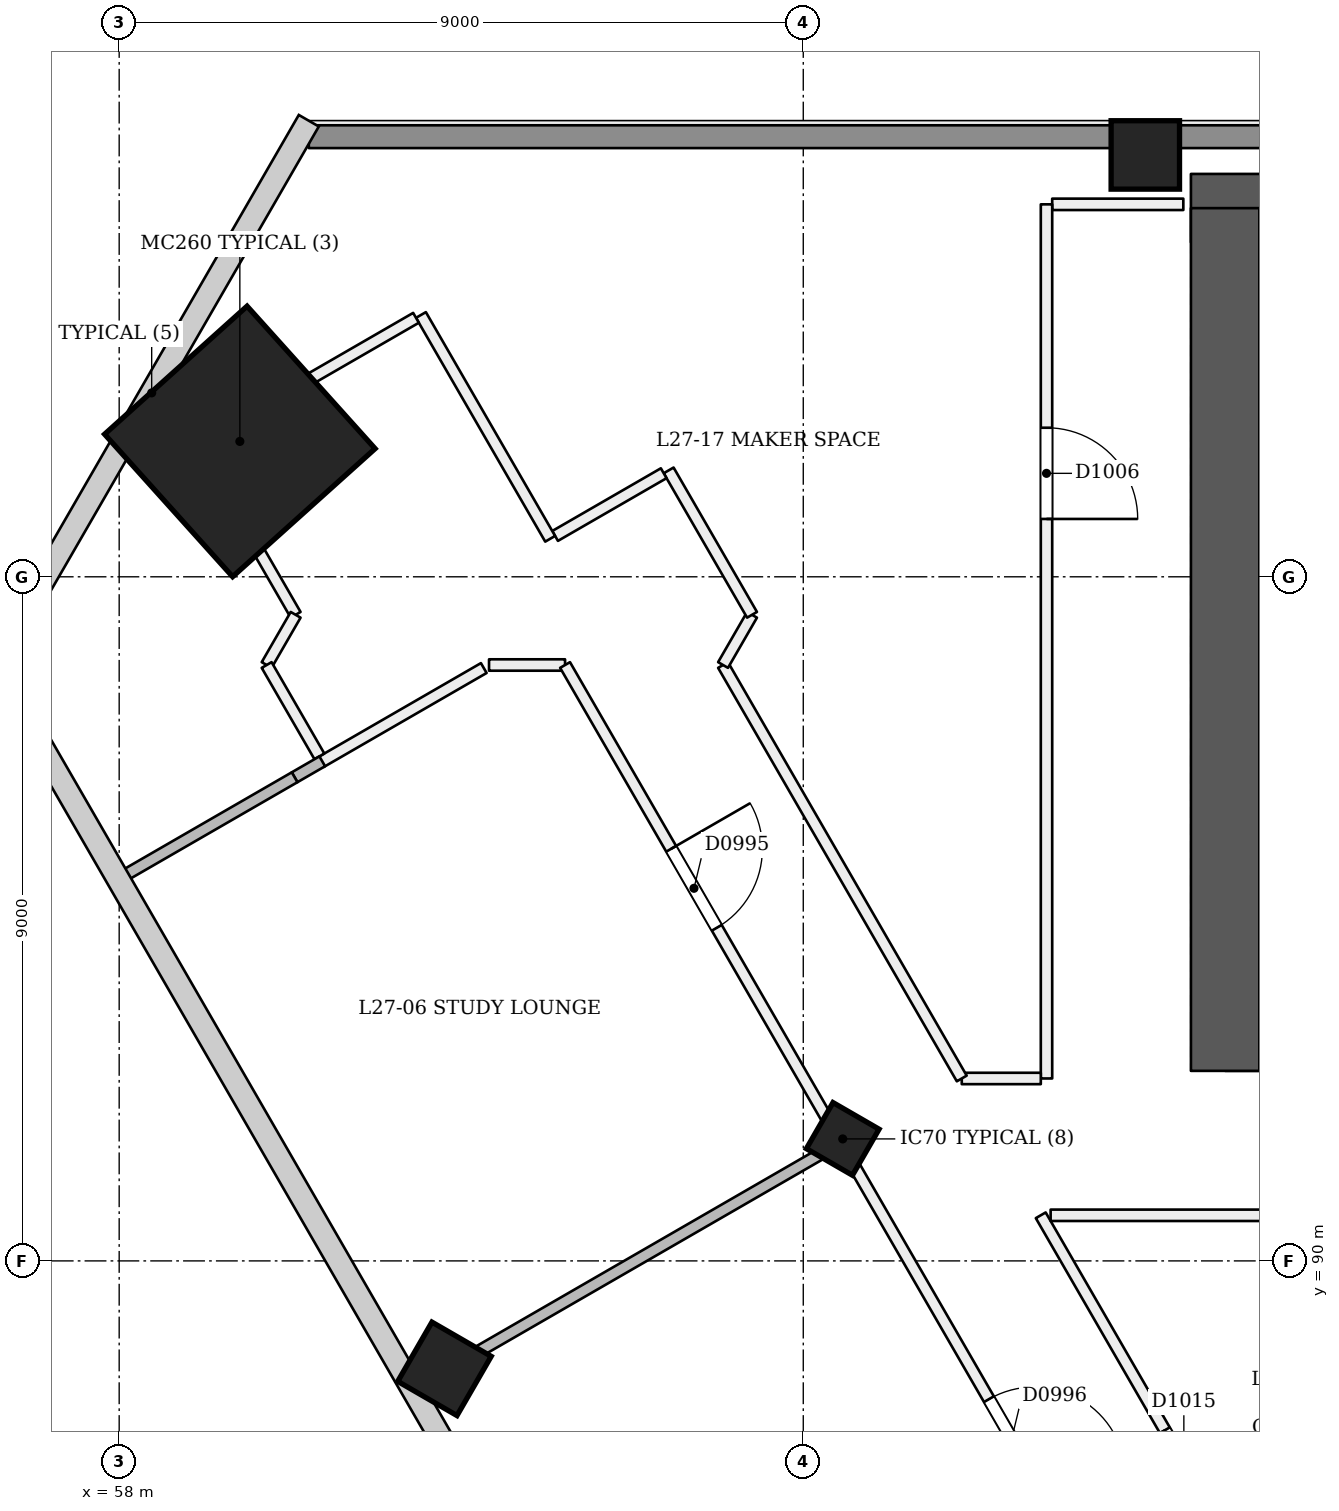
"""IFC4 building model, lengths in metres.
Left out: names, types, materials, properties, quantities, classifications, styles, units other than length and angle.
Written with IfcOpenShell. Run it as: python <this file> out.ifc"""

import sys

from ifc_helpers import new_model, si_unit, direction, frame, frame_2d, origin, origin_2d, place, context, subcontext, project, spatial, rectangle, extrude, element, fill, save


model = new_model("IFC4")
c1 = context("Model", 3, precision=1e-05, world=origin(), true_north=direction((0.0, 1.0)))
c2 = subcontext(c1, "Body", "Model", "MODEL_VIEW")
j1 = project(units=[si_unit("LENGTHUNIT", "METRE"), si_unit("PLANEANGLEUNIT", "RADIAN")], contexts=[c1])
p1 = place(None, origin())
s1 = spatial("IfcSite", under=j1, at=p1, CompositionType="ELEMENT")
p2 = place(p1, origin())
s2 = spatial("IfcBuilding", under=s1, at=p2, CompositionType="ELEMENT")
p3 = place(p2, frame((0.0, 0.0, 108.0)))
s3 = spatial("IfcBuildingStorey", under=s2, at=p3, CompositionType="ELEMENT", Elevation=108.0)
p4 = place(p3, frame((72.55, 92.95, 0.0), z_axis=(0.0, 0.0, 1.0), x_axis=(1.0, 0.0, 0.0)))
e1 = element("IfcWall", 1, at=p4, inside=s3, PredefinedType="SHEAR", context=c2, shape_type="SweptSolid", body=[
    extrude(rectangle(XDim=25.35, YDim=0.9, at=frame_2d((12.675, 0.0))), origin(), (0.0, 0.0, 1.0), 3.6),
])
p5 = place(p4, frame((1.25, 0.0, 0.0)))
e2 = element("IfcOpeningElement", 2, at=p5, cuts=e1, PredefinedType="OPENING", context=c2, shape_type="SweptSolid", body=[
    extrude(rectangle(XDim=1.2, YDim=2.1, at=frame_2d((0.6, 1.05))), frame((0.0, 0.46, 0.0), z_axis=(0.0, -1.0, 0.0), x_axis=(1.0, 0.0, 0.0)), (0.0, 0.0, 1.0), 0.921),
])
p6 = place(p4, frame((3.45, 0.0, 0.0)))
e3 = element("IfcOpeningElement", 3, at=p6, cuts=e1, PredefinedType="OPENING", context=c2, shape_type="SweptSolid", body=[
    extrude(rectangle(XDim=1.2, YDim=2.1, at=frame_2d((0.6, 1.05))), frame((0.0, 0.46, 0.0), z_axis=(0.0, -1.0, 0.0), x_axis=(1.0, 0.0, 0.0)), (0.0, 0.0, 1.0), 0.921),
])
p7 = place(p4, frame((13.45, 0.0, 0.0)))
e4 = element("IfcOpeningElement", 4, at=p7, cuts=e1, PredefinedType="OPENING", context=c2, shape_type="SweptSolid", body=[
    extrude(rectangle(XDim=1.2, YDim=2.1, at=frame_2d((0.6, 1.05))), frame((0.0, 0.46, 0.0), z_axis=(0.0, -1.0, 0.0), x_axis=(1.0, 0.0, 0.0)), (0.0, 0.0, 1.0), 0.921),
])
p8 = place(p4, frame((15.712, 0.0, 0.0)))
e5 = element("IfcOpeningElement", 5, at=p8, cuts=e1, PredefinedType="OPENING", context=c2, shape_type="SweptSolid", body=[
    extrude(rectangle(XDim=1.0, YDim=2.1, at=frame_2d((0.5, 1.05))), frame((0.0, 0.46, 0.0), z_axis=(0.0, -1.0, 0.0), x_axis=(1.0, 0.0, 0.0)), (0.0, 0.0, 1.0), 0.921),
])
p9 = place(p4, frame((18.35, 0.0, 0.0)))
e6 = element("IfcOpeningElement", 6, at=p9, cuts=e1, PredefinedType="OPENING", context=c2, shape_type="SweptSolid", body=[
    extrude(rectangle(XDim=1.0, YDim=2.1, at=frame_2d((0.5, 1.05))), frame((0.0, 0.46, 0.0), z_axis=(0.0, -1.0, 0.0), x_axis=(1.0, 0.0, 0.0)), (0.0, 0.0, 1.0), 0.921),
])
p10 = place(p4, frame((21.938, 0.0, 0.0)))
e7 = element("IfcOpeningElement", 7, at=p10, cuts=e1, PredefinedType="OPENING", context=c2, shape_type="SweptSolid", body=[
    extrude(rectangle(XDim=1.0, YDim=2.1, at=frame_2d((0.5, 1.05))), frame((0.0, 0.46, 0.0), z_axis=(0.0, -1.0, 0.0), x_axis=(1.0, 0.0, 0.0)), (0.0, 0.0, 1.0), 0.921),
])
p11 = place(p3, frame((97.45, 103.85, 0.0), z_axis=(0.0, 0.0, 1.0), x_axis=(-1.0, 0.0, 0.0)))
e8 = element("IfcWall", 8, at=p11, inside=s3, PredefinedType="SHEAR", context=c2, shape_type="SweptSolid", body=[
    extrude(rectangle(XDim=25.35, YDim=0.9, at=frame_2d((12.675, 0.0))), origin(), (0.0, 0.0, 1.0), 3.6),
])
p12 = place(p3, frame((72.55, 103.85, 0.0), z_axis=(0.0, 0.0, 1.0), x_axis=(0.0, -1.0, 0.0)))
e9 = element("IfcWall", 9, at=p12, inside=s3, PredefinedType="SHEAR", context=c2, shape_type="SweptSolid", body=[
    extrude(rectangle(XDim=11.35, YDim=0.9, at=frame_2d((5.675, 0.0))), origin(), (0.0, 0.0, 1.0), 3.6),
])
p13 = place(p3, frame((67.492, 91.558, -0.021), z_axis=(0.022221406801, 0.038413224561, 0.999014831351), x_axis=(-0.866021380218, -0.498527772566, 0.0384321348)))
e10 = element("IfcColumn", 10, at=p13, inside=s3, PredefinedType="COLUMN", context=c2, shape_type="SweptSolid", body=[
    extrude(rectangle(XDim=0.7, YDim=0.7, at=origin_2d()), origin(), (0.0, 0.0, 1.0), 3.604),
])
p14 = place(p3, frame((59.553, 100.77, 0.0), z_axis=(0.028401796786, 0.009286506348, 0.999553449666), x_axis=(-0.866201942086, 0.499294741171, 0.019973907107)))
e11 = element("IfcColumn", 11, at=p14, inside=s3, PredefinedType="COLUMN", context=c2, shape_type="SweptSolid", body=[
    extrude(rectangle(XDim=2.52, YDim=2.52, at=origin_2d()), origin(), (0.0, 0.0, 1.0), 3.602),
])
p15 = place(p3, frame((71.5, 104.55, 0.0), z_axis=(0.0, 0.0, 1.0), x_axis=(1.0, 0.0, 0.0)))
e12 = element("IfcColumn", 12, at=p15, inside=s3, PredefinedType="COLUMN", context=c2, shape_type="SweptSolid", body=[
    extrude(rectangle(XDim=0.9, YDim=0.9, at=origin_2d()), origin(), (0.0, 0.0, 1.0), 3.6),
])
p16 = place(p3, frame((62.252, 88.532, -0.027), z_axis=(0.022153634206, 0.038480930364, 0.999013730882), x_axis=(-0.864982397443, -0.500326676419, 0.038453465087)))
e13 = element("IfcColumn", 13, at=p16, inside=s3, PredefinedType="COLUMN", context=c2, shape_type="SweptSolid", body=[
    extrude(rectangle(XDim=0.9, YDim=0.9, at=origin_2d()), origin(), (0.0, 0.0, 1.0), 3.604),
])
p17 = place(p3, frame((60.654, 96.563, 0.0), z_axis=(0.0, 0.0, 1.0), x_axis=(0.86603602817, 0.499981597573, 0.0)))
e14 = element("IfcWall", 14, at=p17, inside=s3, PredefinedType="PARTITIONING", context=c2, shape_type="SweptSolid", body=[
    extrude(rectangle(XDim=2.474, YDim=0.15, at=frame_2d((1.237, 0.0))), origin(), (0.0, 0.0, 1.0), 2.6),
])
p18 = place(p3, frame((62.866, 97.84, 0.0), z_axis=(0.0, 0.0, 1.0), x_axis=(1.0, 0.0, 0.0)))
e15 = element("IfcWall", 15, at=p18, inside=s3, PredefinedType="PARTITIONING", context=c2, shape_type="SweptSolid", body=[
    extrude(rectangle(XDim=1.0, YDim=0.15, at=frame_2d((0.5, 0.0))), origin(), (0.0, 0.0, 1.0), 3.1),
])
p19 = place(p3, frame((63.866, 97.84, 0.0), z_axis=(0.0, 0.0, 1.0), x_axis=(0.499996899578, -0.866027193807, 0.0)))
e16 = element("IfcWall", 16, at=p19, inside=s3, PredefinedType="PARTITIONING", context=c2, shape_type="SweptSolid", body=[
    extrude(rectangle(XDim=41.505, YDim=0.15, at=frame_2d((20.752, 0.0))), origin(), (0.0, 0.0, 1.0), 2.7),
])
p20 = place(p19, frame((2.792, 0.0, 0.0)))
e17 = element("IfcOpeningElement", 17, at=p20, cuts=e16, PredefinedType="OPENING", context=c2, shape_type="SweptSolid", body=[
    extrude(rectangle(XDim=1.2, YDim=2.1, at=frame_2d((0.6, 1.05))), frame((0.0, 0.085, 0.0), z_axis=(0.0, -1.0, 0.0), x_axis=(1.0, 0.0, 0.0)), (0.0, 0.0, 1.0), 0.171),
])
p21 = place(p19, frame((11.153, 0.0, 0.0)))
e18 = element("IfcOpeningElement", 18, at=p21, cuts=e16, PredefinedType="OPENING", context=c2, shape_type="SweptSolid", body=[
    extrude(rectangle(XDim=1.2, YDim=2.1, at=frame_2d((0.6, 1.05))), frame((0.0, 0.085, 0.0), z_axis=(0.0, -1.0, 0.0), x_axis=(1.0, 0.0, 0.0)), (0.0, 0.0, 1.0), 0.171),
])
p22 = place(p19, frame((22.403, 0.0, 0.0)))
e19 = element("IfcOpeningElement", 19, at=p22, cuts=e16, PredefinedType="OPENING", context=c2, shape_type="SweptSolid", body=[
    extrude(rectangle(XDim=1.2, YDim=2.1, at=frame_2d((0.6, 1.05))), frame((0.0, 0.085, 0.0), z_axis=(0.0, -1.0, 0.0), x_axis=(1.0, 0.0, 0.0)), (0.0, 0.0, 1.0), 0.171),
])
p23 = place(p19, frame((32.553, 0.0, 0.0)))
e20 = element("IfcOpeningElement", 20, at=p23, cuts=e16, PredefinedType="OPENING", context=c2, shape_type="SweptSolid", body=[
    extrude(rectangle(XDim=1.2, YDim=2.1, at=frame_2d((0.6, 1.05))), frame((0.0, 0.085, 0.0), z_axis=(0.0, -1.0, 0.0), x_axis=(1.0, 0.0, 0.0)), (0.0, 0.0, 1.0), 0.171),
])
p24 = place(p19, frame((39.864, 0.0, 0.0)))
e21 = element("IfcOpeningElement", 21, at=p24, cuts=e16, PredefinedType="OPENING", context=c2, shape_type="SweptSolid", body=[
    extrude(rectangle(XDim=1.0, YDim=2.1, at=frame_2d((0.5, 1.05))), frame((0.0, 0.085, 0.0), z_axis=(0.0, -1.0, 0.0), x_axis=(1.0, 0.0, 0.0)), (0.0, 0.0, 1.0), 0.171),
])
p25 = place(p3, frame((72.0, 103.9, 0.0), z_axis=(0.0, 0.0, 1.0), x_axis=(-1.0, 0.0, 0.0)))
e22 = element("IfcWall", 22, at=p25, inside=s3, PredefinedType="PARTITIONING", context=c2, shape_type="SweptSolid", body=[
    extrude(rectangle(XDim=1.725, YDim=0.15, at=frame_2d((0.863, 0.0))), origin(), (0.0, 0.0, 1.0), 2.6),
])
p26 = place(p3, frame((70.2, 103.9, 0.0), z_axis=(0.0, 0.0, 1.0), x_axis=(0.0, -1.0, 0.0)))
e23 = element("IfcWall", 23, at=p26, inside=s3, PredefinedType="PARTITIONING", context=c2, shape_type="SweptSolid", body=[
    extrude(rectangle(XDim=11.5, YDim=0.15, at=frame_2d((5.75, 0.0))), origin(), (0.0, 0.0, 1.0), 2.6),
])
p27 = place(p26, frame((2.939, 0.0, 0.0)))
e24 = element("IfcOpeningElement", 24, at=p27, cuts=e23, PredefinedType="OPENING", context=c2, shape_type="SweptSolid", body=[
    extrude(rectangle(XDim=1.2, YDim=2.1, at=frame_2d((0.6, 1.05))), frame((0.0, 0.085, 0.0), z_axis=(0.0, -1.0, 0.0), x_axis=(1.0, 0.0, 0.0)), (0.0, 0.0, 1.0), 0.171),
])
p28 = place(p3, frame((70.125, 92.4, 0.0), z_axis=(0.0, 0.0, 1.0), x_axis=(-1.0, 0.0, 0.0)))
e25 = element("IfcWall", 25, at=p28, inside=s3, PredefinedType="PARTITIONING", context=c2, shape_type="SweptSolid", body=[
    extrude(rectangle(XDim=1.04, YDim=0.15, at=frame_2d((0.52, 0.0))), origin(), (0.0, 0.0, 1.0), 3.1),
])
p29 = place(p3, frame((69.085, 92.4, 0.0), z_axis=(0.0, 0.0, 1.0), x_axis=(-0.500001709782, 0.866024416639, 0.0)))
e26 = element("IfcWall", 26, at=p29, inside=s3, PredefinedType="PARTITIONING", context=c2, shape_type="SweptSolid", body=[
    extrude(rectangle(XDim=6.281, YDim=0.15, at=frame_2d((3.141, 0.0))), origin(), (0.0, 0.0, 1.0), 3.1),
])
p30 = place(p3, frame((65.945, 97.84, 0.0), z_axis=(0.0, 0.0, 1.0), x_axis=(0.50006423267, 0.865988315859, 0.0)))
e27 = element("IfcWall", 27, at=p30, inside=s3, PredefinedType="PARTITIONING", context=c2, shape_type="SweptSolid", body=[
    extrude(rectangle(XDim=0.763, YDim=0.15, at=frame_2d((0.381, 0.0))), origin(), (0.0, 0.0, 1.0), 3.1),
])
p31 = place(p3, frame((66.326, 98.5, 0.0), z_axis=(0.0, 0.0, 1.0), x_axis=(-0.500005024956, 0.866022502605, 0.0)))
e28 = element("IfcWall", 28, at=p31, inside=s3, PredefinedType="PARTITIONING", context=c2, shape_type="SweptSolid", body=[
    extrude(rectangle(XDim=2.194, YDim=0.15, at=frame_2d((1.097, 0.0))), origin(), (0.0, 0.0, 1.0), 3.1),
])
p32 = place(p3, frame((65.164, 100.363, 0.0), z_axis=(0.0, 0.0, 1.0), x_axis=(-0.866040211805, -0.499974350878, 0.0)))
e29 = element("IfcWall", 29, at=p32, inside=s3, PredefinedType="PARTITIONING", context=c2, shape_type="SweptSolid", body=[
    extrude(rectangle(XDim=1.65, YDim=0.15, at=frame_2d((0.825, 0.0))), origin(), (0.0, 0.0, 1.0), 3.1),
])
p33 = place(p3, frame((63.67, 99.5, 0.0), z_axis=(0.0, 0.0, 1.0), x_axis=(-0.500031147688, 0.866007419912, 0.0)))
e30 = element("IfcWall", 30, at=p33, inside=s3, PredefinedType="PARTITIONING", context=c2, shape_type="SweptSolid", body=[
    extrude(rectangle(XDim=3.4, YDim=0.15, at=frame_2d((1.7, 0.0))), origin(), (0.0, 0.0, 1.0), 2.6),
])
p34 = place(p3, frame((61.905, 102.407, 0.0), z_axis=(0.0, 0.0, 1.0), x_axis=(-0.866002163101, -0.500040251884, 0.0)))
e31 = element("IfcWall", 31, at=p34, inside=s3, PredefinedType="PARTITIONING", context=c2, shape_type="SweptSolid", body=[
    extrude(rectangle(XDim=3.325, YDim=0.15, at=frame_2d((1.663, 0.0))), origin(), (0.0, 0.0, 1.0), 2.6),
])
p35 = place(p3, frame((59.063, 100.679, 0.0), z_axis=(0.0, 0.0, 1.0), x_axis=(0.500072327845, -0.865983641256, 0.0)))
e32 = element("IfcWall", 32, at=p35, inside=s3, PredefinedType="PARTITIONING", context=c2, shape_type="SweptSolid", body=[
    extrude(rectangle(XDim=2.517, YDim=0.15, at=frame_2d((1.258, 0.0))), origin(), (0.0, 0.0, 1.0), 2.6),
])
p36 = place(p3, frame((60.322, 98.5, 0.0), z_axis=(0.0, 0.0, 1.0), x_axis=(-0.50006423267, -0.865988315859, 0.0)))
e33 = element("IfcWall", 33, at=p36, inside=s3, PredefinedType="PARTITIONING", context=c2, shape_type="SweptSolid", body=[
    extrude(rectangle(XDim=0.763, YDim=0.15, at=frame_2d((0.381, 0.0))), origin(), (0.0, 0.0, 1.0), 2.6),
])
p37 = place(p3, frame((59.94, 97.84, 0.0), z_axis=(0.0, 0.0, 1.0), x_axis=(0.499961027969, -0.866047903128, 0.0)))
e34 = element("IfcWall", 34, at=p37, inside=s3, PredefinedType="PARTITIONING", context=c2, shape_type="SweptSolid", body=[
    extrude(rectangle(XDim=1.388, YDim=0.15, at=frame_2d((0.694, 0.0))), origin(), (0.0, 0.0, 1.0), 2.6),
])
p38 = place(p3, frame((85.0, 64.834, 0.0), z_axis=(0.0, 0.0, 1.0), x_axis=(-0.499998535175, 0.8660262495, 0.0)))
e35 = element("IfcWall", 35, at=p38, inside=s3, PredefinedType="PARTITIONING", context=c2, shape_type="SweptSolid", body=[
    extrude(rectangle(XDim=29.751, YDim=0.15, at=frame_2d((14.876, 0.0))), origin(), (0.0, 0.0, 1.0), 3.1),
])
p39 = place(p38, frame((11.629, 0.0, 0.0)))
e36 = element("IfcOpeningElement", 36, at=p39, cuts=e35, PredefinedType="OPENING", context=c2, shape_type="SweptSolid", body=[
    extrude(rectangle(XDim=1.2, YDim=2.1, at=frame_2d((0.6, 1.05))), frame((0.0, 0.085, 0.0), z_axis=(0.0, -1.0, 0.0), x_axis=(1.0, 0.0, 0.0)), (0.0, 0.0, 1.0), 0.171),
])
p40 = place(p38, frame((8.136, 0.0, 0.0)))
e37 = element("IfcOpeningElement", 37, at=p40, cuts=e35, PredefinedType="OPENING", context=c2, shape_type="SweptSolid", body=[
    extrude(rectangle(XDim=1.2, YDim=2.1, at=frame_2d((0.6, 1.05))), frame((0.0, 0.085, 0.0), z_axis=(0.0, -1.0, 0.0), x_axis=(1.0, 0.0, 0.0)), (0.0, 0.0, 1.0), 0.171),
])
p41 = place(p38, frame((15.887, 0.0, 0.0)))
e38 = element("IfcOpeningElement", 38, at=p41, cuts=e35, PredefinedType="OPENING", context=c2, shape_type="SweptSolid", body=[
    extrude(rectangle(XDim=1.0, YDim=2.1, at=frame_2d((0.5, 1.05))), frame((0.0, 0.085, 0.0), z_axis=(0.0, -1.0, 0.0), x_axis=(1.0, 0.0, 0.0)), (0.0, 0.0, 1.0), 0.171),
])
p42 = place(p38, frame((3.673, 0.0, 0.0)))
e39 = element("IfcOpeningElement", 39, at=p42, cuts=e35, PredefinedType="OPENING", context=c2, shape_type="SweptSolid", body=[
    extrude(rectangle(XDim=1.0, YDim=2.1, at=frame_2d((0.5, 1.05))), frame((0.0, 0.085, 0.0), z_axis=(0.0, -1.0, 0.0), x_axis=(1.0, 0.0, 0.0)), (0.0, 0.0, 1.0), 0.171),
])
p43 = place(p38, frame((20.45, 0.0, 0.0)))
e40 = element("IfcOpeningElement", 40, at=p43, cuts=e35, PredefinedType="OPENING", context=c2, shape_type="SweptSolid", body=[
    extrude(rectangle(XDim=1.0, YDim=2.1, at=frame_2d((0.5, 1.05))), frame((0.0, 0.085, 0.0), z_axis=(0.0, -1.0, 0.0), x_axis=(1.0, 0.0, 0.0)), (0.0, 0.0, 1.0), 0.171),
])
p44 = place(p38, frame((25.486, 0.0, 0.0)))
e41 = element("IfcOpeningElement", 41, at=p44, cuts=e35, PredefinedType="OPENING", context=c2, shape_type="SweptSolid", body=[
    extrude(rectangle(XDim=1.0, YDim=2.1, at=frame_2d((0.5, 1.05))), frame((0.0, 0.085, 0.0), z_axis=(0.0, -1.0, 0.0), x_axis=(1.0, 0.0, 0.0)), (0.0, 0.0, 1.0), 0.171),
])
p45 = place(p3, frame((70.254, 90.6, 0.0), z_axis=(0.0, 0.0, 1.0), x_axis=(0.999999996544, -8.3141069e-05, 0.0)))
e42 = element("IfcWall", 42, at=p45, inside=s3, PredefinedType="PARTITIONING", context=c2, shape_type="SweptSolid", body=[
    extrude(rectangle(XDim=11.746, YDim=0.15, at=frame_2d((5.873, 0.0))), origin(), (0.0, 0.0, 1.0), 3.1),
])
p46 = place(p45, frame((5.834, 0.0, 0.0)))
e43 = element("IfcOpeningElement", 43, at=p46, cuts=e42, PredefinedType="OPENING", context=c2, shape_type="SweptSolid", body=[
    extrude(rectangle(XDim=0.9, YDim=2.1, at=frame_2d((0.45, 1.05))), frame((0.0, 0.085, 0.0), z_axis=(0.0, -1.0, 0.0), x_axis=(1.0, 0.0, 0.0)), (0.0, 0.0, 1.0), 0.171),
])
p47 = place(p45, frame((10.546, 0.0, 0.0)))
e44 = element("IfcOpeningElement", 44, at=p47, cuts=e42, PredefinedType="OPENING", context=c2, shape_type="SweptSolid", body=[
    extrude(rectangle(XDim=1.0, YDim=2.1, at=frame_2d((0.5, 1.05))), frame((0.0, 0.085, 0.0), z_axis=(0.0, -1.0, 0.0), x_axis=(1.0, 0.0, 0.0)), (0.0, 0.0, 1.0), 0.171),
])
p48 = place(p3, frame((61.95, 88.359, 0.0), z_axis=(0.0, 0.0, 1.0), x_axis=(0.866015887322, 0.500016482634, 0.0)))
e45 = element("IfcWall", 45, at=p48, inside=s3, PredefinedType="PARTITIONING", context=c2, shape_type="SweptSolid", body=[
    extrude(rectangle(XDim=6.325, YDim=0.15, at=frame_2d((3.163, 0.0))), origin(), (0.0, 0.0, 1.0), 2.6),
])
p49 = place(p3, frame((60.672, 96.573, 0.0), z_axis=(0.0, 0.0, 1.0), x_axis=(-0.866088799389, -0.499890179513, 0.0)))
e46 = element("IfcWall", 46, at=p49, inside=s3, PredefinedType="PARTITIONING", context=c2, shape_type="SweptSolid", body=[
    extrude(rectangle(XDim=0.42, YDim=0.15, at=frame_2d((0.21, 0.0))), origin(), (0.0, 0.0, 1.0), 2.6),
])
p50 = place(p3, frame((60.308, 96.363, 0.0), z_axis=(0.0, 0.0, 1.0), x_axis=(-0.866021702275, -0.500006411147, 0.0)))
e47 = element("IfcWall", 47, at=p50, inside=s3, PredefinedType="PARTITIONING", context=c2, shape_type="SweptSolid", body=[
    extrude(rectangle(XDim=2.58, YDim=0.15, at=frame_2d((1.29, 0.0))), origin(), (0.0, 0.0, 1.0), 3.1),
])
p51 = place(p3, frame((60.495, 104.79, 0.0), z_axis=(0.0, 0.0, 1.0), x_axis=(1.0, 0.0, 0.0)))
e48 = element("IfcWall", 48, at=p51, inside=s3, PredefinedType="SOLIDWALL", context=c2, shape_type="SweptSolid", body=[
    extrude(rectangle(XDim=49.011, YDim=0.3, at=frame_2d((24.505, 0.0))), origin(), (0.0, 0.0, 1.0), 2.6),
])
p52 = place(p20, origin())
e49 = element("IfcDoor", 49, at=p52, inside=s3, OperationType="SINGLE_SWING_LEFT", PredefinedType="NOTDEFINED", context=c2, shape_type="SweptSolid", body=[
    extrude(rectangle(XDim=1.2, YDim=2.1, at=frame_2d((0.6, 1.05))), frame((0.0, 0.025, 0.0), z_axis=(0.0, -1.0, 0.0), x_axis=(1.0, 0.0, 0.0)), (0.0, 0.0, 1.0), 0.05),
])
fill(e17, e49)
p53 = place(p21, origin())
e50 = element("IfcDoor", 50, at=p53, inside=s3, OperationType="SINGLE_SWING_RIGHT", PredefinedType="NOTDEFINED", context=c2, shape_type="SweptSolid", body=[
    extrude(rectangle(XDim=1.2, YDim=2.1, at=frame_2d((0.6, 1.05))), frame((0.0, 0.025, 0.0), z_axis=(0.0, -1.0, 0.0), x_axis=(1.0, 0.0, 0.0)), (0.0, 0.0, 1.0), 0.05),
])
fill(e18, e50)
p54 = place(p27, origin())
e51 = element("IfcDoor", 51, at=p54, inside=s3, OperationType="SINGLE_SWING_RIGHT", PredefinedType="NOTDEFINED", context=c2, shape_type="SweptSolid", body=[
    extrude(rectangle(XDim=1.2, YDim=2.1, at=frame_2d((0.6, 1.05))), frame((0.0, 0.025, 0.0), z_axis=(0.0, -1.0, 0.0), x_axis=(1.0, 0.0, 0.0)), (0.0, 0.0, 1.0), 0.05),
])
fill(e24, e51)
p55 = place(p44, origin())
e52 = element("IfcDoor", 52, at=p55, inside=s3, OperationType="SINGLE_SWING_RIGHT", PredefinedType="NOTDEFINED", context=c2, shape_type="SweptSolid", body=[
    extrude(rectangle(XDim=1.0, YDim=2.1, at=frame_2d((0.5, 1.05))), frame((0.0, 0.025, 0.0), z_axis=(0.0, -1.0, 0.0), x_axis=(1.0, 0.0, 0.0)), (0.0, 0.0, 1.0), 0.05),
])
fill(e41, e52)
save(model, sys.argv[1])
